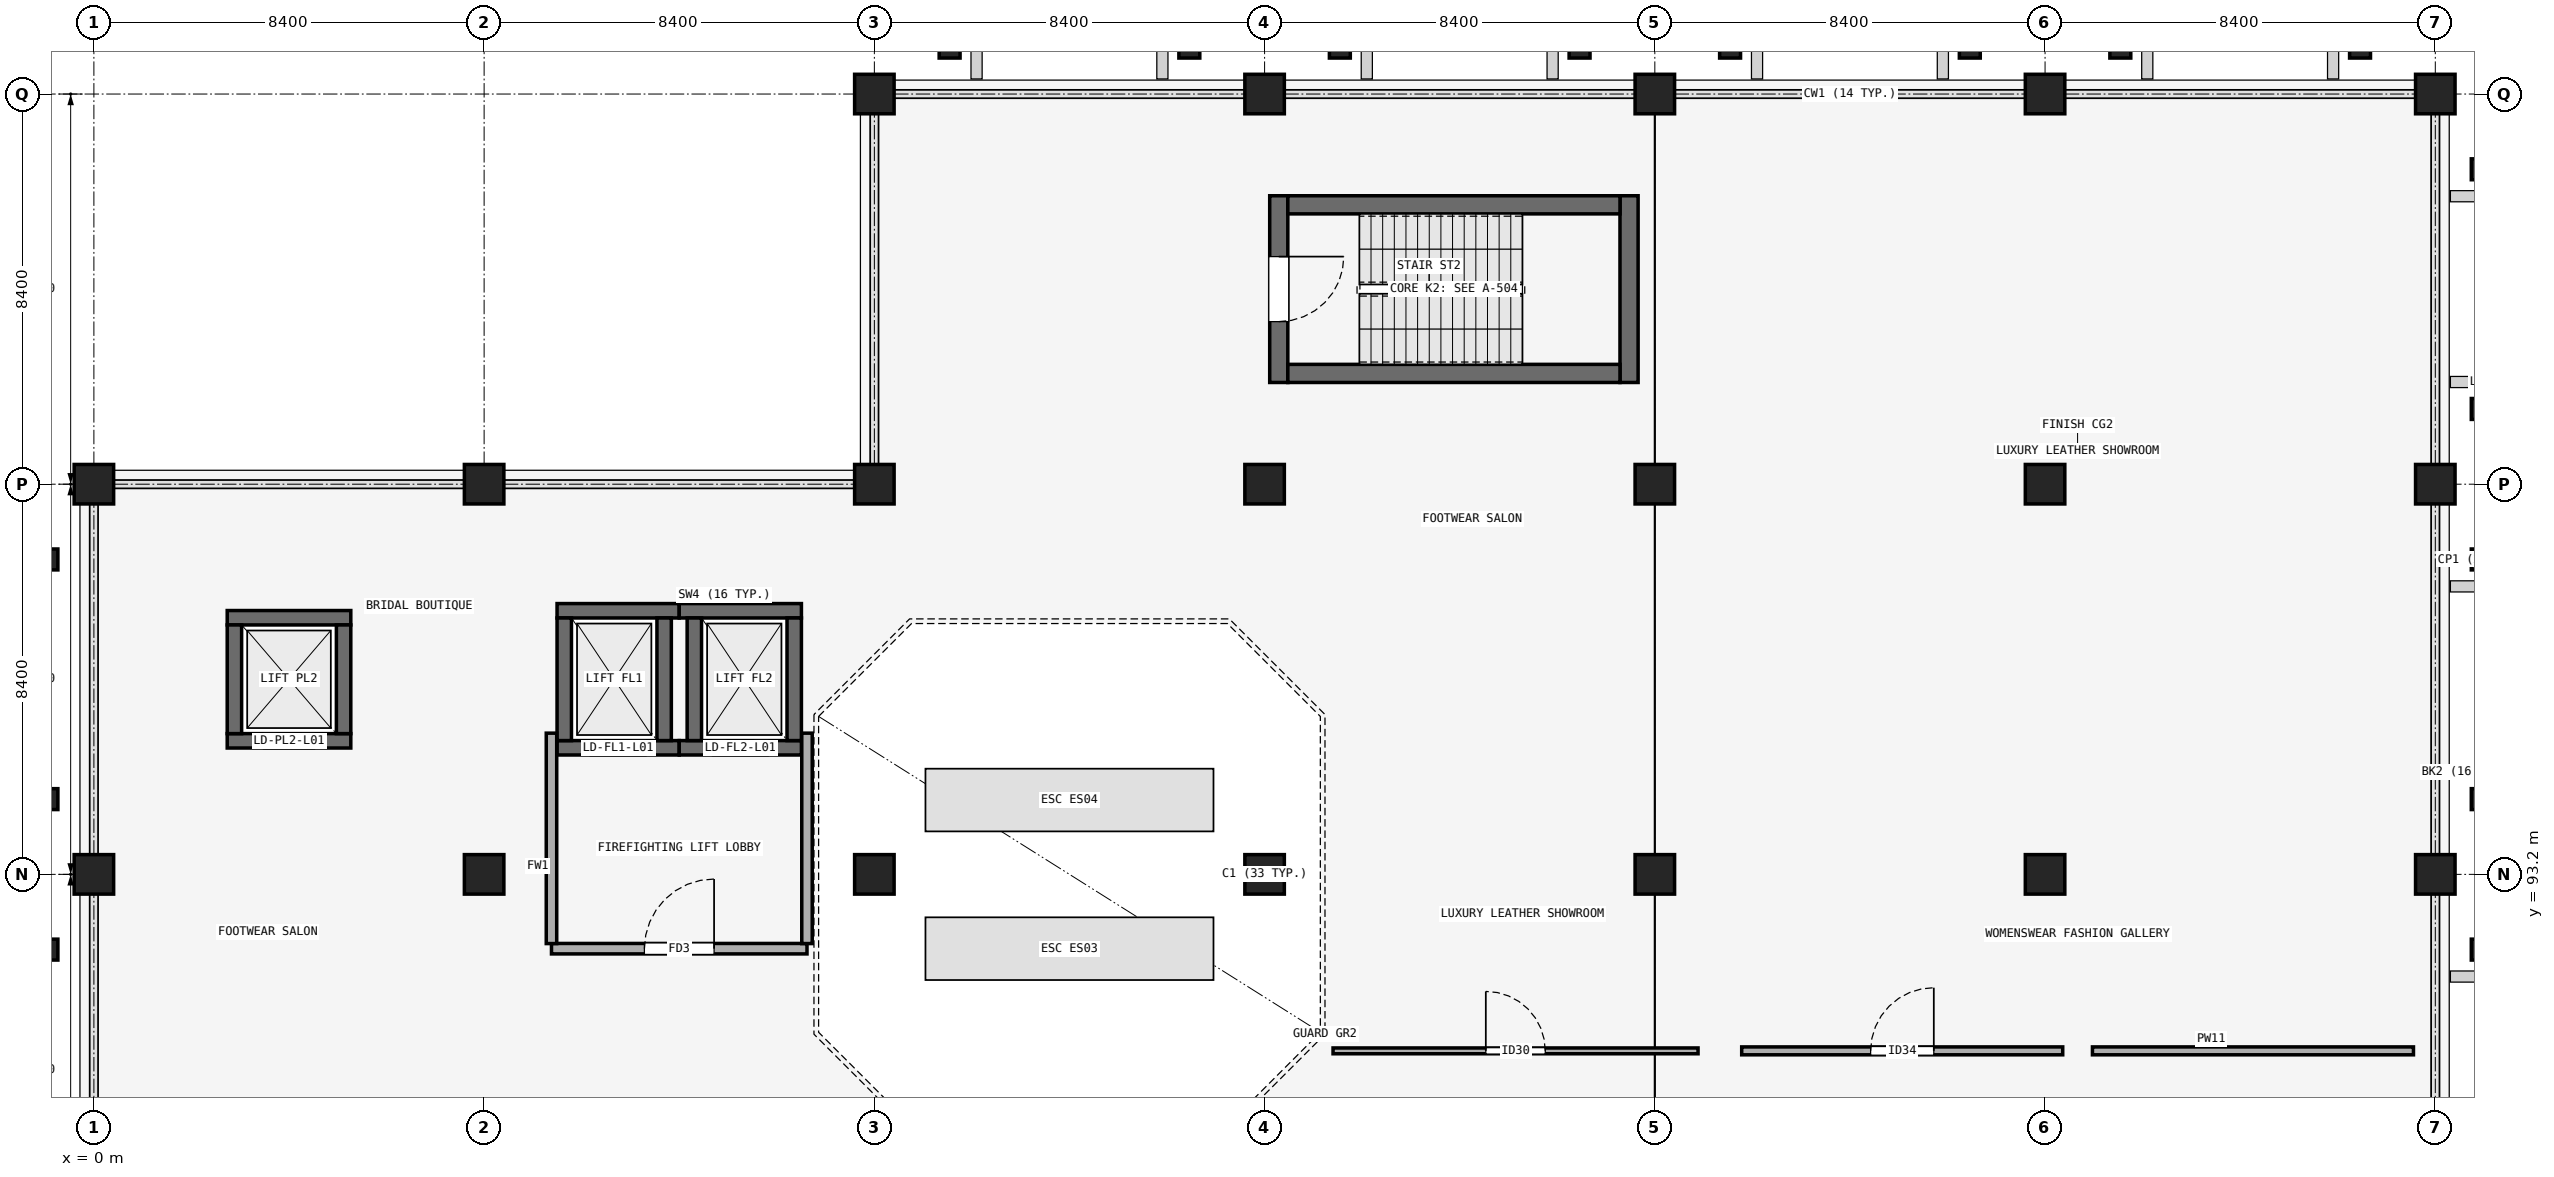
"""IFC4 building model, lengths in metres.
Left out: names, types, materials, properties, quantities, classifications, styles, units other than length and angle.
Written with IfcOpenShell. Run it as: python <this file> out.ifc"""

import sys

from ifc_helpers import new_model, si_unit, direction, frame, frame_2d, origin, origin_2d, place, context, subcontext, project, spatial, rectangle, extrude, element, fill, save


model = new_model("IFC4")
c1 = context("Model", 3, precision=1e-05, world=origin(), true_north=direction((0.0, 1.0)))
c2 = subcontext(c1, "Body", "Model", "MODEL_VIEW")
j1 = project(units=[si_unit("LENGTHUNIT", "METRE"), si_unit("PLANEANGLEUNIT", "RADIAN")], contexts=[c1])
p1 = place(None, origin())
s1 = spatial("IfcSite", under=j1, at=p1, CompositionType="ELEMENT")
p2 = place(p1, origin())
s2 = spatial("IfcBuilding", under=s1, at=p2, CompositionType="ELEMENT")
p3 = place(p2, frame((0.0, 0.0, 5.4)))
s3 = spatial("IfcBuildingStorey", under=s2, at=p3, CompositionType="ELEMENT", Elevation=5.4)
for number, where, z_axis, x_axis in (
    (1, (0.0, 93.2, 0.0), (0.0, 0.0, 1.0), (1.0, 0.0, 0.0)),
    (2, (8.4, 93.2, 0.0), (0.0, 0.0, 1.0), (1.0, 0.0, 0.0)),
    (3, (16.8, 93.2, 0.0), (0.0, 0.0, 1.0), (1.0, 0.0, 0.0)),
    (4, (25.2, 93.2, 0.0), (0.0, 0.0, 1.0), (1.0, 0.0, 0.0)),
    (5, (33.6, 93.2, 0.0), (0.0, 0.0, 1.0), (1.0, 0.0, 0.0)),
    (6, (42.0, 93.2, 0.0), (0.0, 0.0, 1.0), (1.0, 0.0, 0.0)),
    (7, (50.4, 93.2, 0.0), (0.0, 0.0, 1.0), (1.0, 0.0, 0.0)),
    (8, (0.0, 101.6, 0.0), (0.0, 0.0, 1.0), (1.0, 0.0, 0.0)),
    (9, (8.4, 101.6, 0.0), (0.0, 0.0, 1.0), (1.0, 0.0, 0.0)),
    (10, (16.8, 101.6, 0.0), (0.0, 0.0, 1.0), (1.0, 0.0, 0.0)),
    (11, (25.2, 101.6, 0.0), (0.0, 0.0, 1.0), (1.0, 0.0, 0.0)),
    (12, (33.6, 101.6, 0.0), (0.0, 0.0, 1.0), (1.0, 0.0, 0.0)),
    (13, (42.0, 101.6, 0.0), (0.0, 0.0, 1.0), (1.0, 0.0, 0.0)),
    (14, (50.4, 101.6, 0.0), (0.0, 0.0, 1.0), (1.0, 0.0, 0.0)),
    (15, (16.8, 110.0, 0.0), (0.0, 0.0, 1.0), (1.0, 0.0, 0.0)),
    (16, (25.2, 110.0, 0.0), (0.0, 0.0, 1.0), (1.0, 0.0, 0.0)),
    (17, (33.6, 110.0, 0.0), (0.0, 0.0, 1.0), (1.0, 0.0, 0.0)),
    (18, (42.0, 110.0, 0.0), (0.0, 0.0, 1.0), (1.0, 0.0, 0.0)),
    (19, (50.4, 110.0, 0.0), (0.0, 0.0, 1.0), (1.0, 0.0, 0.0)),
):
    element("IfcColumn", number, at=place(p3, frame(where, z_axis=z_axis, x_axis=x_axis)), inside=s3, PredefinedType="COLUMN", context=c2, shape_type="SweptSolid", body=[
        extrude(rectangle(XDim=0.85, YDim=0.85, at=origin_2d()), origin(), (0.0, 0.0, 1.0), 4.5),
    ])
for number, where, z_axis, x_axis in (
    (20, (18.42, 111.05, 0.0), (0.0, 0.0, 1.0), (1.0, 0.0, 0.0)),
    (21, (23.58, 111.05, 0.0), (0.0, 0.0, 1.0), (1.0, 0.0, 0.0)),
    (22, (26.82, 111.05, 0.0), (0.0, 0.0, 1.0), (1.0, 0.0, 0.0)),
    (23, (31.98, 111.05, 0.0), (0.0, 0.0, 1.0), (1.0, 0.0, 0.0)),
    (24, (35.22, 111.05, 0.0), (0.0, 0.0, 1.0), (1.0, 0.0, 0.0)),
    (25, (40.38, 111.05, 0.0), (0.0, 0.0, 1.0), (1.0, 0.0, 0.0)),
    (26, (43.62, 111.05, 0.0), (0.0, 0.0, 1.0), (1.0, 0.0, 0.0)),
    (27, (48.78, 111.05, 0.0), (0.0, 0.0, 1.0), (1.0, 0.0, 0.0)),
    (28, (-1.05, 91.58, 0.0), (0.0, 0.0, 1.0), (0.0, 1.0, 0.0)),
    (29, (-1.05, 94.82, 0.0), (0.0, 0.0, 1.0), (0.0, 1.0, 0.0)),
    (30, (-1.05, 99.98, 0.0), (0.0, 0.0, 1.0), (0.0, 1.0, 0.0)),
    (31, (51.45, 91.58, 0.0), (0.0, 0.0, 1.0), (0.0, 1.0, 0.0)),
    (32, (51.45, 94.82, 0.0), (0.0, 0.0, 1.0), (0.0, 1.0, 0.0)),
    (33, (51.45, 99.98, 0.0), (0.0, 0.0, 1.0), (0.0, 1.0, 0.0)),
    (34, (51.45, 103.22, 0.0), (0.0, 0.0, 1.0), (0.0, 1.0, 0.0)),
    (35, (51.45, 108.38, 0.0), (0.0, 0.0, 1.0), (0.0, 1.0, 0.0)),
):
    element("IfcColumn", number, at=place(p3, frame(where, z_axis=z_axis, x_axis=x_axis)), inside=s3, PredefinedType="PILASTER", context=c2, shape_type="SweptSolid", body=[
        extrude(rectangle(XDim=0.45, YDim=0.55, at=origin_2d()), origin(), (0.0, 0.0, 1.0), 4.5),
    ])
p4 = place(p3, frame((25.505, 107.81, 0.0), z_axis=(0.0, 0.0, 1.0), x_axis=(0.0, -1.0, 0.0)))
e36 = element("IfcWall", 36, at=p4, inside=s3, PredefinedType="SHEAR", context=c2, shape_type="SweptSolid", body=[
    extrude(rectangle(XDim=4.02, YDim=0.39, at=frame_2d((2.01, 0.0))), origin(), (0.0, 0.0, 1.0), 4.2),
])
p5 = place(p4, frame((1.31, 0.0, 0.0)))
e37 = element("IfcOpeningElement", 37, at=p5, cuts=e36, PredefinedType="OPENING", context=c2, shape_type="SweptSolid", body=[
    extrude(rectangle(XDim=1.4, YDim=2.15, at=frame_2d((0.7, 1.075))), frame((0.0, 0.205, 0.0), z_axis=(0.0, -1.0, 0.0), x_axis=(1.0, 0.0, 0.0)), (0.0, 0.0, 1.0), 0.41),
])
p6 = place(p3, frame((33.045, 103.79, 0.0), z_axis=(0.0, 0.0, 1.0), x_axis=(0.0, 1.0, 0.0)))
e38 = element("IfcWall", 38, at=p6, inside=s3, PredefinedType="SHEAR", context=c2, shape_type="SweptSolid", body=[
    extrude(rectangle(XDim=4.02, YDim=0.39, at=frame_2d((2.01, 0.0))), origin(), (0.0, 0.0, 1.0), 4.2),
])
for number, where, z_axis, x_axis in (
    (39, (25.7, 103.985, 0.0), (0.0, 0.0, 1.0), (1.0, 0.0, 0.0)),
    (40, (25.7, 107.615, 0.0), (0.0, 0.0, 1.0), (1.0, 0.0, 0.0)),
):
    element("IfcWall", number, at=place(p3, frame(where, z_axis=z_axis, x_axis=x_axis)), inside=s3, PredefinedType="SHEAR", context=c2, shape_type="SweptSolid", body=[
        extrude(rectangle(XDim=7.15, YDim=0.39, at=frame_2d((3.575, 0.0))), origin(), (0.0, 0.0, 1.0), 4.2),
    ])
p7 = place(p3, frame((9.97, 95.925, 0.0), z_axis=(0.0, 0.0, 1.0), x_axis=(1.0, 0.0, 0.0)))
e41 = element("IfcWall", 41, at=p7, inside=s3, PredefinedType="SHEAR", context=c2, shape_type="SweptSolid", body=[
    extrude(rectangle(XDim=2.63, YDim=0.31, at=frame_2d((1.315, 0.0))), origin(), (0.0, 0.0, 1.0), 4.2),
])
p8 = place(p7, frame((0.715, 0.0, 0.0)))
e42 = element("IfcOpeningElement", 42, at=p8, cuts=e41, PredefinedType="OPENING", context=c2, shape_type="SweptSolid", body=[
    extrude(rectangle(XDim=1.2, YDim=2.25, at=frame_2d((0.6, 1.125))), frame((0.0, 0.165, 0.0), z_axis=(0.0, -1.0, 0.0), x_axis=(1.0, 0.0, 0.0)), (0.0, 0.0, 1.0), 0.33),
])
p9 = place(p3, frame((9.97, 98.875, 0.0), z_axis=(0.0, 0.0, 1.0), x_axis=(1.0, 0.0, 0.0)))
e43 = element("IfcWall", 43, at=p9, inside=s3, PredefinedType="SHEAR", context=c2, shape_type="SweptSolid", body=[
    extrude(rectangle(XDim=2.63, YDim=0.31, at=frame_2d((1.315, 0.0))), origin(), (0.0, 0.0, 1.0), 4.2),
])
for number, where, z_axis, x_axis in (
    (44, (10.125, 96.08, 0.0), (0.0, 0.0, 1.0), (0.0, 1.0, 0.0)),
    (45, (12.275, 96.08, 0.0), (0.0, 0.0, 1.0), (0.0, 1.0, 0.0)),
):
    element("IfcWall", number, at=place(p3, frame(where, z_axis=z_axis, x_axis=x_axis)), inside=s3, PredefinedType="SHEAR", context=c2, shape_type="SweptSolid", body=[
        extrude(rectangle(XDim=2.64, YDim=0.31, at=frame_2d((1.32, 0.0))), origin(), (0.0, 0.0, 1.0), 4.2),
    ])
p10 = place(p3, frame((12.6, 95.925, 0.0), z_axis=(0.0, 0.0, 1.0), x_axis=(1.0, 0.0, 0.0)))
e46 = element("IfcWall", 46, at=p10, inside=s3, PredefinedType="SHEAR", context=c2, shape_type="SweptSolid", body=[
    extrude(rectangle(XDim=2.63, YDim=0.31, at=frame_2d((1.315, 0.0))), origin(), (0.0, 0.0, 1.0), 4.2),
])
p11 = place(p10, frame((0.715, 0.0, 0.0)))
e47 = element("IfcOpeningElement", 47, at=p11, cuts=e46, PredefinedType="OPENING", context=c2, shape_type="SweptSolid", body=[
    extrude(rectangle(XDim=1.2, YDim=2.25, at=frame_2d((0.6, 1.125))), frame((0.0, 0.165, 0.0), z_axis=(0.0, -1.0, 0.0), x_axis=(1.0, 0.0, 0.0)), (0.0, 0.0, 1.0), 0.33),
])
p12 = place(p3, frame((12.6, 98.875, 0.0), z_axis=(0.0, 0.0, 1.0), x_axis=(1.0, 0.0, 0.0)))
e48 = element("IfcWall", 48, at=p12, inside=s3, PredefinedType="SHEAR", context=c2, shape_type="SweptSolid", body=[
    extrude(rectangle(XDim=2.63, YDim=0.31, at=frame_2d((1.315, 0.0))), origin(), (0.0, 0.0, 1.0), 4.2),
])
for number, where, z_axis, x_axis in (
    (49, (12.925, 96.08, 0.0), (0.0, 0.0, 1.0), (0.0, 1.0, 0.0)),
    (50, (15.075, 96.08, 0.0), (0.0, 0.0, 1.0), (0.0, 1.0, 0.0)),
):
    element("IfcWall", number, at=place(p3, frame(where, z_axis=z_axis, x_axis=x_axis)), inside=s3, PredefinedType="SHEAR", context=c2, shape_type="SweptSolid", body=[
        extrude(rectangle(XDim=2.64, YDim=0.31, at=frame_2d((1.32, 0.0))), origin(), (0.0, 0.0, 1.0), 4.2),
    ])
p13 = place(p3, frame((2.87, 96.075, 0.0), z_axis=(0.0, 0.0, 1.0), x_axis=(1.0, 0.0, 0.0)))
e51 = element("IfcWall", 51, at=p13, inside=s3, PredefinedType="SHEAR", context=c2, shape_type="SweptSolid", body=[
    extrude(rectangle(XDim=2.66, YDim=0.31, at=frame_2d((1.33, 0.0))), origin(), (0.0, 0.0, 1.0), 4.2),
])
p14 = place(p13, frame((0.78, 0.0, 0.0)))
e52 = element("IfcOpeningElement", 52, at=p14, cuts=e51, PredefinedType="OPENING", context=c2, shape_type="SweptSolid", body=[
    extrude(rectangle(XDim=1.1, YDim=2.2, at=frame_2d((0.55, 1.1))), frame((0.0, 0.165, 0.0), z_axis=(0.0, -1.0, 0.0), x_axis=(1.0, 0.0, 0.0)), (0.0, 0.0, 1.0), 0.33),
])
p15 = place(p3, frame((2.87, 98.725, 0.0), z_axis=(0.0, 0.0, 1.0), x_axis=(1.0, 0.0, 0.0)))
e53 = element("IfcWall", 53, at=p15, inside=s3, PredefinedType="SHEAR", context=c2, shape_type="SweptSolid", body=[
    extrude(rectangle(XDim=2.66, YDim=0.31, at=frame_2d((1.33, 0.0))), origin(), (0.0, 0.0, 1.0), 4.2),
])
for number, where, z_axis, x_axis in (
    (54, (3.025, 96.23, 0.0), (0.0, 0.0, 1.0), (0.0, 1.0, 0.0)),
    (55, (5.375, 96.23, 0.0), (0.0, 0.0, 1.0), (0.0, 1.0, 0.0)),
):
    element("IfcWall", number, at=place(p3, frame(where, z_axis=z_axis, x_axis=x_axis)), inside=s3, PredefinedType="SHEAR", context=c2, shape_type="SweptSolid", body=[
        extrude(rectangle(XDim=2.34, YDim=0.31, at=frame_2d((1.17, 0.0))), origin(), (0.0, 0.0, 1.0), 4.2),
    ])
p16 = place(p3, frame((9.85, 91.6, 0.0), z_axis=(0.0, 0.0, 1.0), x_axis=(1.0, 0.0, 0.0)))
e56 = element("IfcWall", 56, at=p16, inside=s3, PredefinedType="PARTITIONING", context=c2, shape_type="SweptSolid", body=[
    extrude(rectangle(XDim=5.5, YDim=0.225, at=frame_2d((2.75, 0.0))), origin(), (0.0, 0.0, 1.0), 4.2),
])
p17 = place(p16, frame((2.0, 0.0, 0.0)))
e57 = element("IfcOpeningElement", 57, at=p17, cuts=e56, PredefinedType="OPENING", context=c2, shape_type="SweptSolid", body=[
    extrude(rectangle(XDim=1.5, YDim=2.25, at=frame_2d((0.75, 1.125))), frame((0.0, 0.123, 0.0), z_axis=(0.0, -1.0, 0.0), x_axis=(1.0, 0.0, 0.0)), (0.0, 0.0, 1.0), 0.245),
])
for number, where, z_axis, x_axis in (
    (58, (9.85, 91.71, 0.0), (0.0, 0.0, 1.0), (0.0, 1.0, 0.0)),
    (59, (15.35, 91.71, 0.0), (0.0, 0.0, 1.0), (0.0, 1.0, 0.0)),
):
    element("IfcWall", number, at=place(p3, frame(where, z_axis=z_axis, x_axis=x_axis)), inside=s3, PredefinedType="PARTITIONING", context=c2, shape_type="SweptSolid", body=[
        extrude(rectangle(XDim=4.53, YDim=0.225, at=frame_2d((2.265, 0.0))), origin(), (0.0, 0.0, 1.0), 3.5),
    ])
p18 = place(p3, frame((26.674, 89.4, 0.0), z_axis=(0.0, 0.0, 1.0), x_axis=(1.0, 0.0, 0.0)))
e60 = element("IfcWall", 60, at=p18, inside=s3, PredefinedType="PARTITIONING", context=c2, shape_type="SweptSolid", body=[
    extrude(rectangle(XDim=7.856, YDim=0.125, at=frame_2d((3.928, 0.0))), origin(), (0.0, 0.0, 1.0), 3.45),
])
p19 = place(p18, frame((3.288, 0.0, 0.0)))
e61 = element("IfcOpeningElement", 61, at=p19, cuts=e60, PredefinedType="OPENING", context=c2, shape_type="SweptSolid", body=[
    extrude(rectangle(XDim=1.28, YDim=2.46, at=frame_2d((0.64, 1.23))), frame((0.0, 0.073, 0.0), z_axis=(0.0, -1.0, 0.0), x_axis=(1.0, 0.0, 0.0)), (0.0, 0.0, 1.0), 0.145),
])
p20 = place(p3, frame((35.47, 89.4, 0.0), z_axis=(0.0, 0.0, 1.0), x_axis=(1.0, 0.0, 0.0)))
e62 = element("IfcWall", 62, at=p20, inside=s3, PredefinedType="PARTITIONING", context=c2, shape_type="SweptSolid", body=[
    extrude(rectangle(XDim=6.91, YDim=0.17, at=frame_2d((3.455, 0.0))), origin(), (0.0, 0.0, 1.0), 3.45),
])
p21 = place(p20, frame((2.775, 0.0, 0.0)))
e63 = element("IfcOpeningElement", 63, at=p21, cuts=e62, PredefinedType="OPENING", context=c2, shape_type="SweptSolid", body=[
    extrude(rectangle(XDim=1.36, YDim=2.46, at=frame_2d((0.68, 1.23))), frame((0.0, 0.095, 0.0), z_axis=(0.0, -1.0, 0.0), x_axis=(1.0, 0.0, 0.0)), (0.0, 0.0, 1.0), 0.19),
])
p22 = place(p3, frame((43.02, 89.4, 0.0), z_axis=(0.0, 0.0, 1.0), x_axis=(1.0, 0.0, 0.0)))
e64 = element("IfcWall", 64, at=p22, inside=s3, PredefinedType="PARTITIONING", context=c2, shape_type="SweptSolid", body=[
    extrude(rectangle(XDim=6.91, YDim=0.17, at=frame_2d((3.455, 0.0))), origin(), (0.0, 0.0, 1.0), 4.2),
])
p23 = place(p5, origin())
e65 = element("IfcDoor", 65, at=p23, inside=s3, OperationType="SINGLE_SWING_LEFT", PredefinedType="DOOR", context=c2, shape_type="SweptSolid", body=[
    extrude(rectangle(XDim=1.4, YDim=2.15, at=frame_2d((0.7, 1.075))), frame((0.0, 0.025, 0.0), z_axis=(0.0, -1.0, 0.0), x_axis=(1.0, 0.0, 0.0)), (0.0, 0.0, 1.0), 0.05),
])
fill(e37, e65)
p24 = place(p8, origin())
e66 = element("IfcDoor", 66, at=p24, inside=s3, OperationType="SLIDING_TO_LEFT", PredefinedType="DOOR", context=c2, shape_type="SweptSolid", body=[
    extrude(rectangle(XDim=1.2, YDim=2.25, at=frame_2d((0.6, 1.125))), frame((0.0, 0.025, 0.0), z_axis=(0.0, -1.0, 0.0), x_axis=(1.0, 0.0, 0.0)), (0.0, 0.0, 1.0), 0.05),
])
fill(e42, e66)
p25 = place(p11, origin())
e67 = element("IfcDoor", 67, at=p25, inside=s3, OperationType="SLIDING_TO_LEFT", PredefinedType="DOOR", context=c2, shape_type="SweptSolid", body=[
    extrude(rectangle(XDim=1.2, YDim=2.25, at=frame_2d((0.6, 1.125))), frame((0.0, 0.025, 0.0), z_axis=(0.0, -1.0, 0.0), x_axis=(1.0, 0.0, 0.0)), (0.0, 0.0, 1.0), 0.05),
])
fill(e47, e67)
p26 = place(p14, origin())
e68 = element("IfcDoor", 68, at=p26, inside=s3, OperationType="SLIDING_TO_LEFT", PredefinedType="DOOR", context=c2, shape_type="SweptSolid", body=[
    extrude(rectangle(XDim=1.1, YDim=2.2, at=frame_2d((0.55, 1.1))), frame((0.0, 0.025, 0.0), z_axis=(0.0, -1.0, 0.0), x_axis=(1.0, 0.0, 0.0)), (0.0, 0.0, 1.0), 0.05),
])
fill(e52, e68)
p27 = place(p17, origin())
e69 = element("IfcDoor", 69, at=p27, inside=s3, OperationType="SINGLE_SWING_RIGHT", PredefinedType="DOOR", context=c2, shape_type="SweptSolid", body=[
    extrude(rectangle(XDim=1.5, YDim=2.25, at=frame_2d((0.75, 1.125))), frame((0.0, 0.025, 0.0), z_axis=(0.0, -1.0, 0.0), x_axis=(1.0, 0.0, 0.0)), (0.0, 0.0, 1.0), 0.05),
])
fill(e57, e69)
p28 = place(p19, origin())
e70 = element("IfcDoor", 70, at=p28, inside=s3, OperationType="SINGLE_SWING_LEFT", PredefinedType="DOOR", context=c2, shape_type="SweptSolid", body=[
    extrude(rectangle(XDim=1.28, YDim=2.46, at=frame_2d((0.64, 1.23))), frame((0.0, 0.025, 0.0), z_axis=(0.0, -1.0, 0.0), x_axis=(1.0, 0.0, 0.0)), (0.0, 0.0, 1.0), 0.05),
])
fill(e61, e70)
p29 = place(p21, origin())
e71 = element("IfcDoor", 71, at=p29, inside=s3, OperationType="SINGLE_SWING_RIGHT", PredefinedType="DOOR", context=c2, shape_type="SweptSolid", body=[
    extrude(rectangle(XDim=1.36, YDim=2.46, at=frame_2d((0.68, 1.23))), frame((0.0, 0.025, 0.0), z_axis=(0.0, -1.0, 0.0), x_axis=(1.0, 0.0, 0.0)), (0.0, 0.0, 1.0), 0.05),
])
fill(e63, e71)
save(model, sys.argv[1])
